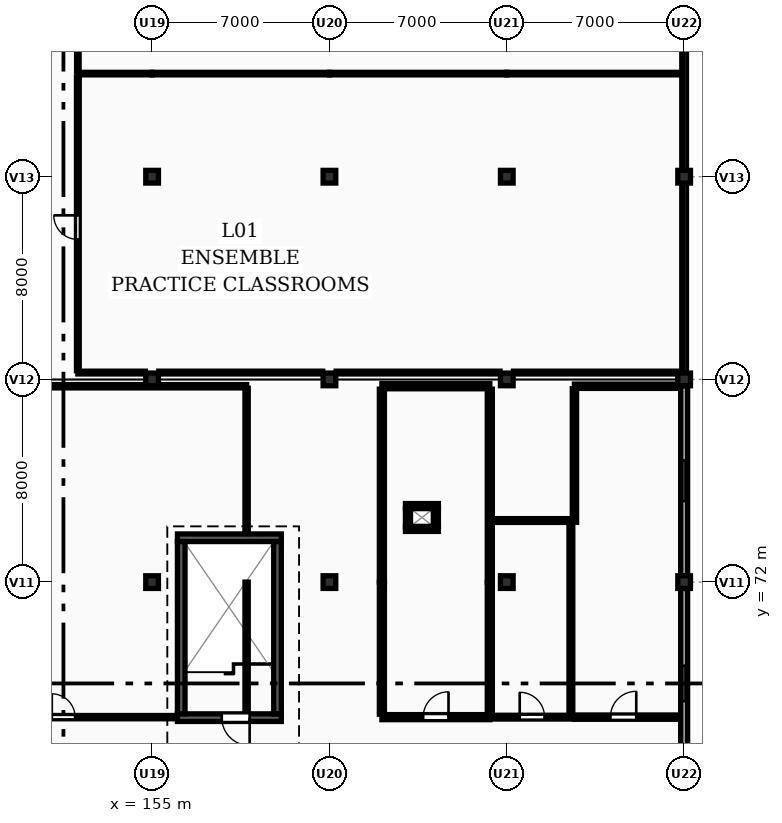
"""IFC4 building model, lengths in metres.
Left out: names, types, materials, properties, quantities, classifications, styles, units other than length and angle.
Written with IfcOpenShell. Run it as: python <this file> out.ifc"""

import sys

from ifc_helpers import new_model, si_unit, direction, frame, frame_2d, origin, origin_2d, place, context, subcontext, project, spatial, rectangle, extrude, element, fill, save


model = new_model("IFC4")
c1 = context("Model", 3, precision=1e-05, world=origin(), true_north=direction((0.0, 1.0)))
c2 = subcontext(c1, "Body", "Model", "MODEL_VIEW")
j1 = project(units=[si_unit("LENGTHUNIT", "METRE"), si_unit("PLANEANGLEUNIT", "RADIAN")], contexts=[c1])
p1 = place(None, origin())
s1 = spatial("IfcSite", under=j1, at=p1, CompositionType="ELEMENT")
p2 = place(p1, origin())
s2 = spatial("IfcBuilding", under=s1, at=p2, CompositionType="ELEMENT")
p3 = place(p2, frame((0.0, 0.0, 4.5)))
s3 = spatial("IfcBuildingStorey", under=s2, at=p3, CompositionType="ELEMENT", Elevation=4.5)
p4 = place(p3, frame((155.0, 72.0, 0.0), z_axis=(0.0, 0.0, 1.0), x_axis=(1.0, 0.0, 0.0)))
e1 = element("IfcColumn", 1, at=p4, inside=s3, PredefinedType="COLUMN", context=c2, shape_type="SweptSolid", body=[
    extrude(rectangle(XDim=0.5, YDim=0.5, at=origin_2d()), origin(), (0.0, 0.0, 1.0), 5.373),
])
p5 = place(p3, frame((155.0, 80.0, 0.0), z_axis=(0.0, 0.0, 1.0), x_axis=(1.0, 0.0, 0.0)))
e2 = element("IfcColumn", 2, at=p5, inside=s3, PredefinedType="COLUMN", context=c2, shape_type="SweptSolid", body=[
    extrude(rectangle(XDim=0.5, YDim=0.5, at=origin_2d()), origin(), (0.0, 0.0, 1.0), 5.958),
])
p6 = place(p3, frame((155.0, 88.0, 0.0), z_axis=(0.0, 0.0, 1.0), x_axis=(1.0, 0.0, 0.0)))
e3 = element("IfcColumn", 3, at=p6, inside=s3, PredefinedType="COLUMN", context=c2, shape_type="SweptSolid", body=[
    extrude(rectangle(XDim=0.5, YDim=0.5, at=origin_2d()), origin(), (0.0, 0.0, 1.0), 4.96),
])
p7 = place(p3, frame((162.0, 72.0, 0.0), z_axis=(0.0, 0.0, 1.0), x_axis=(1.0, 0.0, 0.0)))
e4 = element("IfcColumn", 4, at=p7, inside=s3, PredefinedType="COLUMN", context=c2, shape_type="SweptSolid", body=[
    extrude(rectangle(XDim=0.5, YDim=0.5, at=origin_2d()), origin(), (0.0, 0.0, 1.0), 5.307),
])
p8 = place(p3, frame((162.0, 80.0, 0.0), z_axis=(0.0, 0.0, 1.0), x_axis=(1.0, 0.0, 0.0)))
e5 = element("IfcColumn", 5, at=p8, inside=s3, PredefinedType="COLUMN", context=c2, shape_type="SweptSolid", body=[
    extrude(rectangle(XDim=0.5, YDim=0.5, at=origin_2d()), origin(), (0.0, 0.0, 1.0), 5.893),
])
p9 = place(p3, frame((162.0, 88.0, 0.0), z_axis=(0.0, 0.0, 1.0), x_axis=(1.0, 0.0, 0.0)))
e6 = element("IfcColumn", 6, at=p9, inside=s3, PredefinedType="COLUMN", context=c2, shape_type="SweptSolid", body=[
    extrude(rectangle(XDim=0.5, YDim=0.5, at=origin_2d()), origin(), (0.0, 0.0, 1.0), 5.365),
])
p10 = place(p3, frame((169.0, 72.0, 0.0), z_axis=(0.0, 0.0, 1.0), x_axis=(1.0, 0.0, 0.0)))
e7 = element("IfcColumn", 7, at=p10, inside=s3, PredefinedType="COLUMN", context=c2, shape_type="SweptSolid", body=[
    extrude(rectangle(XDim=0.5, YDim=0.5, at=origin_2d()), origin(), (0.0, 0.0, 1.0), 5.241),
])
p11 = place(p3, frame((169.0, 80.0, 0.0), z_axis=(0.0, 0.0, 1.0), x_axis=(1.0, 0.0, 0.0)))
e8 = element("IfcColumn", 8, at=p11, inside=s3, PredefinedType="COLUMN", context=c2, shape_type="SweptSolid", body=[
    extrude(rectangle(XDim=0.5, YDim=0.5, at=origin_2d()), origin(), (0.0, 0.0, 1.0), 5.827),
])
p12 = place(p3, frame((169.0, 88.0, 0.0), z_axis=(0.0, 0.0, 1.0), x_axis=(1.0, 0.0, 0.0)))
e9 = element("IfcColumn", 9, at=p12, inside=s3, PredefinedType="COLUMN", context=c2, shape_type="SweptSolid", body=[
    extrude(rectangle(XDim=0.5, YDim=0.5, at=origin_2d()), origin(), (0.0, 0.0, 1.0), 5.771),
])
p13 = place(p3, frame((176.0, 72.0, 0.0), z_axis=(0.0, 0.0, 1.0), x_axis=(1.0, 0.0, 0.0)))
e10 = element("IfcColumn", 10, at=p13, inside=s3, PredefinedType="COLUMN", context=c2, shape_type="SweptSolid", body=[
    extrude(rectangle(XDim=0.5, YDim=0.5, at=origin_2d()), origin(), (0.0, 0.0, 1.0), 5.175),
])
p14 = place(p3, frame((176.0, 80.0, 0.0), z_axis=(0.0, 0.0, 1.0), x_axis=(1.0, 0.0, 0.0)))
e11 = element("IfcColumn", 11, at=p14, inside=s3, PredefinedType="COLUMN", context=c2, shape_type="SweptSolid", body=[
    extrude(rectangle(XDim=0.5, YDim=0.5, at=origin_2d()), origin(), (0.0, 0.0, 1.0), 5.761),
])
p15 = place(p3, frame((176.0, 88.0, 0.0), z_axis=(0.0, 0.0, 1.0), x_axis=(1.0, 0.0, 0.0)))
e12 = element("IfcColumn", 12, at=p15, inside=s3, PredefinedType="COLUMN", context=c2, shape_type="SweptSolid", body=[
    extrude(rectangle(XDim=0.5, YDim=0.5, at=origin_2d()), origin(), (0.0, 0.0, 1.0), 6.176),
])
p16 = place(p3, frame((176.0, 71.75, 0.0), z_axis=(0.0, 0.0, 1.0), x_axis=(0.0, -1.0, 0.0)))
e13 = element("IfcWall", 13, at=p16, inside=s3, PredefinedType="SOLIDWALL", context=c2, shape_type="SweptSolid", body=[
    extrude(rectangle(XDim=7.5, YDim=0.275, at=frame_2d((3.75, 0.0))), origin(), (0.0, 0.0, 1.0), 3.878),
])
p17 = place(p16, frame((3.05, 0.0, 0.95)))
e14 = element("IfcOpeningElement", 14, at=p17, cuts=e13, PredefinedType="OPENING", context=c2, shape_type="SweptSolid", body=[
    extrude(rectangle(XDim=1.4, YDim=1.65, at=frame_2d((0.7, 0.825))), frame((0.0, 0.147, 0.0), z_axis=(0.0, -1.0, 0.0), x_axis=(1.0, 0.0, 0.0)), (0.0, 0.0, 1.0), 0.295),
])
p18 = place(p3, frame((176.0, 79.75, 0.0), z_axis=(0.0, 0.0, 1.0), x_axis=(0.0, -1.0, 0.0)))
e15 = element("IfcWall", 15, at=p18, inside=s3, PredefinedType="SOLIDWALL", context=c2, shape_type="SweptSolid", body=[
    extrude(rectangle(XDim=7.5, YDim=0.275, at=frame_2d((3.75, 0.0))), origin(), (0.0, 0.0, 1.0), 4.464),
])
p19 = place(p18, frame((2.95, 0.0, 0.95)))
e16 = element("IfcOpeningElement", 16, at=p19, cuts=e15, PredefinedType="OPENING", context=c2, shape_type="SweptSolid", body=[
    extrude(rectangle(XDim=1.6, YDim=1.65, at=frame_2d((0.8, 0.825))), frame((0.0, 0.147, 0.0), z_axis=(0.0, -1.0, 0.0), x_axis=(1.0, 0.0, 0.0)), (0.0, 0.0, 1.0), 0.295),
])
for number, where, z_axis, x_axis in (
    (17, (176.0, 95.75, 0.0), (0.0, 0.0, 1.0), (0.0, -1.0, 0.0)),
    (18, (176.0, 87.75, 0.0), (0.0, 0.0, 1.0), (0.0, -1.0, 0.0)),
):
    element("IfcWall", number, at=place(p3, frame(where, z_axis=z_axis, x_axis=x_axis)), inside=s3, PredefinedType="SOLIDWALL", context=c2, shape_type="SweptSolid", body=[
        extrude(rectangle(XDim=7.5, YDim=0.185, at=frame_2d((3.75, 0.0))), origin(), (0.0, 0.0, 1.0), 0.95),
    ])
p20 = place(p3, frame((160.1, 66.65, 0.0), z_axis=(0.0, 0.0, 1.0), x_axis=(-1.0, 0.0, 0.0)))
e19 = element("IfcWall", 19, at=p20, inside=s3, PredefinedType="SHEAR", context=c2, shape_type="SweptSolid", body=[
    extrude(rectangle(XDim=4.1, YDim=0.3, at=frame_2d((2.05, 0.0))), origin(), (0.0, 0.0, 1.0), 5.803),
])
p21 = place(p20, frame((1.25, 0.0, 0.0)))
e20 = element("IfcOpeningElement", 20, at=p21, cuts=e19, PredefinedType="OPENING", context=c2, shape_type="SweptSolid", body=[
    extrude(rectangle(XDim=1.1, YDim=2.15, at=frame_2d((0.55, 1.075))), frame((0.0, 0.16, 0.0), z_axis=(0.0, -1.0, 0.0), x_axis=(1.0, 0.0, 0.0)), (0.0, 0.0, 1.0), 0.32),
])
p22 = place(p3, frame((156.0, 73.75, 0.0), z_axis=(0.0, 0.0, 1.0), x_axis=(1.0, 0.0, 0.0)))
e21 = element("IfcWall", 21, at=p22, inside=s3, PredefinedType="SHEAR", context=c2, shape_type="SweptSolid", body=[
    extrude(rectangle(XDim=4.1, YDim=0.3, at=frame_2d((2.05, 0.0))), origin(), (0.0, 0.0, 1.0), 5.803),
])
for number, where, z_axis, x_axis in (
    (22, (159.95, 66.8, 0.0), (0.0, 0.0, 1.0), (0.0, 1.0, 0.0)),
    (23, (156.15, 73.6, 0.0), (0.0, 0.0, 1.0), (0.0, -1.0, 0.0)),
):
    element("IfcWall", number, at=place(p3, frame(where, z_axis=z_axis, x_axis=x_axis)), inside=s3, PredefinedType="SHEAR", context=c2, shape_type="SweptSolid", body=[
        extrude(rectangle(XDim=6.8, YDim=0.3, at=frame_2d((3.4, 0.0))), origin(), (0.0, 0.0, 1.0), 5.803),
    ])
for number, where, z_axis, x_axis in (
    (24, (166.3, 74.1, 0.0), (0.0, 0.0, 1.0), (-1.0, 0.0, 0.0)),
    (25, (165.0, 75.0, 0.0), (0.0, 0.0, 1.0), (1.0, 0.0, 0.0)),
):
    element("IfcWall", number, at=place(p3, frame(where, z_axis=z_axis, x_axis=x_axis)), inside=s3, PredefinedType="PARTITIONING", context=c2, shape_type="SweptSolid", body=[
        extrude(rectangle(XDim=1.3, YDim=0.2, at=frame_2d((0.65, 0.0))), origin(), (0.0, 0.0, 1.0), 3.65),
    ])
for number, where, z_axis, x_axis in (
    (26, (165.1, 74.2, 0.0), (0.0, 0.0, 1.0), (0.0, 1.0, 0.0)),
    (27, (166.2, 74.9, 0.0), (0.0, 0.0, 1.0), (0.0, -1.0, 0.0)),
):
    element("IfcWall", number, at=place(p3, frame(where, z_axis=z_axis, x_axis=x_axis)), inside=s3, PredefinedType="PARTITIONING", context=c2, shape_type="SweptSolid", body=[
        extrude(rectangle(XDim=0.7, YDim=0.2, at=frame_2d((0.35, 0.0))), origin(), (0.0, 0.0, 1.0), 3.65),
    ])
p23 = place(p3, frame((147.87, 66.67, 0.0), z_axis=(0.0, 0.0, 1.0), x_axis=(1.0, 0.0, 0.0)))
e28 = element("IfcWall", 28, at=p23, inside=s3, PredefinedType="PARTITIONING", context=c2, shape_type="SweptSolid", body=[
    extrude(rectangle(XDim=8.11, YDim=0.13, at=frame_2d((4.055, 0.0))), origin(), (0.0, 0.0, 1.0), 3.65),
])
p24 = place(p23, frame((3.17, 0.0, 0.0)))
e29 = element("IfcOpeningElement", 29, at=p24, cuts=e28, PredefinedType="OPENING", context=c2, shape_type="SweptSolid", body=[
    extrude(rectangle(XDim=0.92, YDim=2.1, at=frame_2d((0.46, 1.05))), frame((0.0, 0.075, 0.0), z_axis=(0.0, -1.0, 0.0), x_axis=(1.0, 0.0, 0.0)), (0.0, 0.0, 1.0), 0.15),
])
p25 = place(p3, frame((148.265, 79.73, 0.0), z_axis=(0.0, 0.0, 1.0), x_axis=(1.0, 0.0, 0.0)))
e30 = element("IfcWall", 30, at=p25, inside=s3, PredefinedType="PARTITIONING", context=c2, shape_type="SweptSolid", body=[
    extrude(rectangle(XDim=10.465, YDim=0.13, at=frame_2d((5.232, 0.0))), origin(), (0.0, 0.0, 1.0), 3.65),
])
p26 = place(p3, frame((158.73, 66.815, 0.0), z_axis=(0.0, 0.0, 1.0), x_axis=(0.0, 1.0, 0.0)))
e31 = element("IfcWall", 31, at=p26, inside=s3, PredefinedType="PARTITIONING", context=c2, shape_type="SweptSolid", body=[
    extrude(rectangle(XDim=5.185, YDim=0.13, at=frame_2d((2.593, 0.0))), origin(), (0.0, 0.0, 1.0), 3.65),
])
p27 = place(p3, frame((158.73, 73.915, 0.0), z_axis=(0.0, 0.0, 1.0), x_axis=(0.0, 1.0, 0.0)))
e32 = element("IfcWall", 32, at=p27, inside=s3, PredefinedType="PARTITIONING", context=c2, shape_type="SweptSolid", body=[
    extrude(rectangle(XDim=5.735, YDim=0.13, at=frame_2d((2.867, 0.0))), origin(), (0.0, 0.0, 1.0), 3.65),
])
p28 = place(p3, frame((164.07, 66.67, 0.0), z_axis=(0.0, 0.0, 1.0), x_axis=(1.0, 0.0, 0.0)))
e33 = element("IfcWall", 33, at=p28, inside=s3, PredefinedType="PARTITIONING", context=c2, shape_type="SweptSolid", body=[
    extrude(rectangle(XDim=4.26, YDim=0.2, at=frame_2d((2.13, 0.0))), origin(), (0.0, 0.0, 1.0), 3.65),
])
p29 = place(p28, frame((1.63, 0.0, 0.0)))
e34 = element("IfcOpeningElement", 34, at=p29, cuts=e33, PredefinedType="OPENING", context=c2, shape_type="SweptSolid", body=[
    extrude(rectangle(XDim=1.0, YDim=2.15, at=frame_2d((0.5, 1.075))), frame((0.0, 0.11, 0.0), z_axis=(0.0, -1.0, 0.0), x_axis=(1.0, 0.0, 0.0)), (0.0, 0.0, 1.0), 0.22),
])
p30 = place(p3, frame((164.07, 79.73, 0.0), z_axis=(0.0, 0.0, 1.0), x_axis=(1.0, 0.0, 0.0)))
e35 = element("IfcWall", 35, at=p30, inside=s3, PredefinedType="PARTITIONING", context=c2, shape_type="SweptSolid", body=[
    extrude(rectangle(XDim=4.26, YDim=0.2, at=frame_2d((2.13, 0.0))), origin(), (0.0, 0.0, 1.0), 3.65),
])
p31 = place(p3, frame((164.07, 66.785, 0.0), z_axis=(0.0, 0.0, 1.0), x_axis=(0.0, 1.0, 0.0)))
e36 = element("IfcWall", 36, at=p31, inside=s3, PredefinedType="PARTITIONING", context=c2, shape_type="SweptSolid", body=[
    extrude(rectangle(XDim=5.215, YDim=0.2, at=frame_2d((2.607, 0.0))), origin(), (0.0, 0.0, 1.0), 3.65),
])
p32 = place(p3, frame((164.07, 72.0, 0.0), z_axis=(0.0, 0.0, 1.0), x_axis=(0.0, 1.0, 0.0)))
e37 = element("IfcWall", 37, at=p32, inside=s3, PredefinedType="PARTITIONING", context=c2, shape_type="SweptSolid", body=[
    extrude(rectangle(XDim=7.615, YDim=0.2, at=frame_2d((3.808, 0.0))), origin(), (0.0, 0.0, 1.0), 3.65),
])
p33 = place(p3, frame((168.33, 66.785, 0.0), z_axis=(0.0, 0.0, 1.0), x_axis=(0.0, 1.0, 0.0)))
e38 = element("IfcWall", 38, at=p33, inside=s3, PredefinedType="PARTITIONING", context=c2, shape_type="SweptSolid", body=[
    extrude(rectangle(XDim=5.215, YDim=0.2, at=frame_2d((2.607, 0.0))), origin(), (0.0, 0.0, 1.0), 3.65),
])
p34 = place(p3, frame((168.33, 72.0, 0.0), z_axis=(0.0, 0.0, 1.0), x_axis=(0.0, 1.0, 0.0)))
e39 = element("IfcWall", 39, at=p34, inside=s3, PredefinedType="PARTITIONING", context=c2, shape_type="SweptSolid", body=[
    extrude(rectangle(XDim=7.615, YDim=0.2, at=frame_2d((3.808, 0.0))), origin(), (0.0, 0.0, 1.0), 3.65),
])
p35 = place(p3, frame((168.47, 66.67, 0.0), z_axis=(0.0, 0.0, 1.0), x_axis=(1.0, 0.0, 0.0)))
e40 = element("IfcWall", 40, at=p35, inside=s3, PredefinedType="PARTITIONING", context=c2, shape_type="SweptSolid", body=[
    extrude(rectangle(XDim=3.06, YDim=0.15, at=frame_2d((1.53, 0.0))), origin(), (0.0, 0.0, 1.0), 3.65),
])
p36 = place(p35, frame((1.04, 0.0, 0.0)))
e41 = element("IfcOpeningElement", 41, at=p36, cuts=e40, PredefinedType="OPENING", context=c2, shape_type="SweptSolid", body=[
    extrude(rectangle(XDim=0.98, YDim=2.1, at=frame_2d((0.49, 1.05))), frame((0.0, 0.085, 0.0), z_axis=(0.0, -1.0, 0.0), x_axis=(1.0, 0.0, 0.0)), (0.0, 0.0, 1.0), 0.17),
])
p37 = place(p3, frame((168.47, 74.43, 0.0), z_axis=(0.0, 0.0, 1.0), x_axis=(1.0, 0.0, 0.0)))
e42 = element("IfcWall", 42, at=p37, inside=s3, PredefinedType="PARTITIONING", context=c2, shape_type="SweptSolid", body=[
    extrude(rectangle(XDim=3.06, YDim=0.15, at=frame_2d((1.53, 0.0))), origin(), (0.0, 0.0, 1.0), 3.65),
])
p38 = place(p3, frame((171.53, 66.76, 0.0), z_axis=(0.0, 0.0, 1.0), x_axis=(0.0, 1.0, 0.0)))
e43 = element("IfcWall", 43, at=p38, inside=s3, PredefinedType="PARTITIONING", context=c2, shape_type="SweptSolid", body=[
    extrude(rectangle(XDim=7.58, YDim=0.15, at=frame_2d((3.79, 0.0))), origin(), (0.0, 0.0, 1.0), 3.65),
])
p39 = place(p3, frame((171.67, 66.67, 0.0), z_axis=(0.0, 0.0, 1.0), x_axis=(1.0, 0.0, 0.0)))
e44 = element("IfcWall", 44, at=p39, inside=s3, PredefinedType="PARTITIONING", context=c2, shape_type="SweptSolid", body=[
    extrude(rectangle(XDim=4.151, YDim=0.17, at=frame_2d((2.075, 0.0))), origin(), (0.0, 0.0, 1.0), 3.65),
])
p40 = place(p39, frame((1.42, 0.0, 0.0)))
e45 = element("IfcOpeningElement", 45, at=p40, cuts=e44, PredefinedType="OPENING", context=c2, shape_type="SweptSolid", body=[
    extrude(rectangle(XDim=1.02, YDim=2.1, at=frame_2d((0.51, 1.05))), frame((0.0, 0.095, 0.0), z_axis=(0.0, -1.0, 0.0), x_axis=(1.0, 0.0, 0.0)), (0.0, 0.0, 1.0), 0.19),
])
p41 = place(p3, frame((171.67, 79.73, 0.0), z_axis=(0.0, 0.0, 1.0), x_axis=(1.0, 0.0, 0.0)))
e46 = element("IfcWall", 46, at=p41, inside=s3, PredefinedType="PARTITIONING", context=c2, shape_type="SweptSolid", body=[
    extrude(rectangle(XDim=4.065, YDim=0.17, at=frame_2d((2.033, 0.0))), origin(), (0.0, 0.0, 1.0), 3.65),
])
p42 = place(p3, frame((171.67, 74.36, 0.0), z_axis=(0.0, 0.0, 1.0), x_axis=(0.0, 1.0, 0.0)))
e47 = element("IfcWall", 47, at=p42, inside=s3, PredefinedType="PARTITIONING", context=c2, shape_type="SweptSolid", body=[
    extrude(rectangle(XDim=5.27, YDim=0.17, at=frame_2d((2.635, 0.0))), origin(), (0.0, 0.0, 1.0), 3.65),
])
p43 = place(p3, frame((152.07, 92.07, 0.0), z_axis=(0.0, 0.0, 1.0), x_axis=(1.0, 0.0, 0.0)))
e48 = element("IfcWall", 48, at=p43, inside=s3, PredefinedType="PARTITIONING", context=c2, shape_type="SweptSolid", body=[
    extrude(rectangle(XDim=2.93, YDim=0.1, at=frame_2d((1.465, 0.0))), origin(), (0.0, 0.0, 1.0), 3.65),
])
for number, where, z_axis, x_axis in (
    (49, (155.0, 92.07, 0.0), (0.0, 0.0, 1.0), (1.0, 0.0, 0.0)),
    (50, (162.0, 92.07, 0.0), (0.0, 0.0, 1.0), (1.0, 0.0, 0.0)),
):
    element("IfcWall", number, at=place(p3, frame(where, z_axis=z_axis, x_axis=x_axis)), inside=s3, PredefinedType="PARTITIONING", context=c2, shape_type="SweptSolid", body=[
        extrude(rectangle(XDim=7.0, YDim=0.1, at=frame_2d((3.5, 0.0))), origin(), (0.0, 0.0, 1.0), 3.65),
    ])
p44 = place(p3, frame((169.0, 92.07, 0.0), z_axis=(0.0, 0.0, 1.0), x_axis=(1.0, 0.0, 0.0)))
e51 = element("IfcWall", 51, at=p44, inside=s3, PredefinedType="PARTITIONING", context=c2, shape_type="SweptSolid", body=[
    extrude(rectangle(XDim=6.865, YDim=0.1, at=frame_2d((3.433, 0.0))), origin(), (0.0, 0.0, 1.0), 3.65),
])
p45 = place(p3, frame((152.07, 92.135, 0.0), z_axis=(0.0, 0.0, 1.0), x_axis=(0.0, 1.0, 0.0)))
e52 = element("IfcWall", 52, at=p45, inside=s3, PredefinedType="PARTITIONING", context=c2, shape_type="SweptSolid", body=[
    extrude(rectangle(XDim=11.73, YDim=0.1, at=frame_2d((5.865, 0.0))), origin(), (0.0, 0.0, 1.0), 3.65),
])
p46 = place(p45, frame((5.405, 0.0, 0.0)))
e53 = element("IfcOpeningElement", 53, at=p46, cuts=e52, PredefinedType="OPENING", context=c2, shape_type="SweptSolid", body=[
    extrude(rectangle(XDim=0.92, YDim=2.1, at=frame_2d((0.46, 1.05))), frame((0.0, 0.06, 0.0), z_axis=(0.0, -1.0, 0.0), x_axis=(1.0, 0.0, 0.0)), (0.0, 0.0, 1.0), 0.12),
])
p47 = place(p3, frame((152.07, 80.27, 0.0), z_axis=(0.0, 0.0, 1.0), x_axis=(1.0, 0.0, 0.0)))
e54 = element("IfcWall", 54, at=p47, inside=s3, PredefinedType="PARTITIONING", context=c2, shape_type="SweptSolid", body=[
    extrude(rectangle(XDim=2.665, YDim=0.11, at=frame_2d((1.333, 0.0))), origin(), (0.0, 0.0, 1.0), 3.65),
])
for number, where, z_axis, x_axis in (
    (55, (155.265, 80.27, 0.0), (0.0, 0.0, 1.0), (1.0, 0.0, 0.0)),
    (56, (162.265, 80.27, 0.0), (0.0, 0.0, 1.0), (1.0, 0.0, 0.0)),
    (57, (169.265, 80.27, 0.0), (0.0, 0.0, 1.0), (1.0, 0.0, 0.0)),
):
    element("IfcWall", number, at=place(p3, frame(where, z_axis=z_axis, x_axis=x_axis)), inside=s3, PredefinedType="PARTITIONING", context=c2, shape_type="SweptSolid", body=[
        extrude(rectangle(XDim=6.47, YDim=0.11, at=frame_2d((3.235, 0.0))), origin(), (0.0, 0.0, 1.0), 3.65),
    ])
p48 = place(p3, frame((152.07, 80.34, 0.0), z_axis=(0.0, 0.0, 1.0), x_axis=(0.0, 1.0, 0.0)))
e58 = element("IfcWall", 58, at=p48, inside=s3, PredefinedType="PARTITIONING", context=c2, shape_type="SweptSolid", body=[
    extrude(rectangle(XDim=11.59, YDim=0.11, at=frame_2d((5.795, 0.0))), origin(), (0.0, 0.0, 1.0), 3.65),
])
p49 = place(p48, frame((5.185, 0.0, 0.0)))
e59 = element("IfcOpeningElement", 59, at=p49, cuts=e58, PredefinedType="OPENING", context=c2, shape_type="SweptSolid", body=[
    extrude(rectangle(XDim=0.95, YDim=2.1, at=frame_2d((0.475, 1.05))), frame((0.0, 0.065, 0.0), z_axis=(0.0, -1.0, 0.0), x_axis=(1.0, 0.0, 0.0)), (0.0, 0.0, 1.0), 0.13),
])
p50 = place(p17, origin())
e60 = element("IfcWindow", 60, at=p50, inside=s3, PartitioningType="SINGLE_PANEL", PredefinedType="WINDOW", context=c2, shape_type="SweptSolid", body=[
    extrude(rectangle(XDim=1.4, YDim=1.65, at=frame_2d((0.7, 0.825))), frame((0.0, 0.03, 0.0), z_axis=(0.0, -1.0, 0.0), x_axis=(1.0, 0.0, 0.0)), (0.0, 0.0, 1.0), 0.06),
])
fill(e14, e60)
p51 = place(p19, origin())
e61 = element("IfcWindow", 61, at=p51, inside=s3, PartitioningType="DOUBLE_PANEL_VERTICAL", PredefinedType="WINDOW", context=c2, shape_type="SweptSolid", body=[
    extrude(rectangle(XDim=1.6, YDim=1.65, at=frame_2d((0.8, 0.825))), frame((0.0, 0.03, 0.0), z_axis=(0.0, -1.0, 0.0), x_axis=(1.0, 0.0, 0.0)), (0.0, 0.0, 1.0), 0.06),
])
fill(e16, e61)
p52 = place(p21, origin())
e62 = element("IfcDoor", 62, at=p52, inside=s3, OperationType="SINGLE_SWING_LEFT", PredefinedType="DOOR", context=c2, shape_type="SweptSolid", body=[
    extrude(rectangle(XDim=1.1, YDim=2.15, at=frame_2d((0.55, 1.075))), frame((0.0, 0.025, 0.0), z_axis=(0.0, -1.0, 0.0), x_axis=(1.0, 0.0, 0.0)), (0.0, 0.0, 1.0), 0.05),
])
fill(e20, e62)
p53 = place(p24, origin())
e63 = element("IfcDoor", 63, at=p53, inside=s3, OperationType="SINGLE_SWING_LEFT", PredefinedType="DOOR", context=c2, shape_type="SweptSolid", body=[
    extrude(rectangle(XDim=0.92, YDim=2.1, at=frame_2d((0.46, 1.05))), frame((0.0, 0.025, 0.0), z_axis=(0.0, -1.0, 0.0), x_axis=(1.0, 0.0, 0.0)), (0.0, 0.0, 1.0), 0.05),
])
fill(e29, e63)
p54 = place(p29, origin())
e64 = element("IfcDoor", 64, at=p54, inside=s3, OperationType="SINGLE_SWING_RIGHT", PredefinedType="DOOR", context=c2, shape_type="SweptSolid", body=[
    extrude(rectangle(XDim=1.0, YDim=2.15, at=frame_2d((0.5, 1.075))), frame((0.0, 0.025, 0.0), z_axis=(0.0, -1.0, 0.0), x_axis=(1.0, 0.0, 0.0)), (0.0, 0.0, 1.0), 0.05),
])
fill(e34, e64)
p55 = place(p36, origin())
e65 = element("IfcDoor", 65, at=p55, inside=s3, OperationType="SINGLE_SWING_LEFT", PredefinedType="DOOR", context=c2, shape_type="SweptSolid", body=[
    extrude(rectangle(XDim=0.98, YDim=2.1, at=frame_2d((0.49, 1.05))), frame((0.0, 0.025, 0.0), z_axis=(0.0, -1.0, 0.0), x_axis=(1.0, 0.0, 0.0)), (0.0, 0.0, 1.0), 0.05),
])
fill(e41, e65)
p56 = place(p40, origin())
e66 = element("IfcDoor", 66, at=p56, inside=s3, OperationType="SINGLE_SWING_RIGHT", PredefinedType="DOOR", context=c2, shape_type="SweptSolid", body=[
    extrude(rectangle(XDim=1.02, YDim=2.1, at=frame_2d((0.51, 1.05))), frame((0.0, 0.025, 0.0), z_axis=(0.0, -1.0, 0.0), x_axis=(1.0, 0.0, 0.0)), (0.0, 0.0, 1.0), 0.05),
])
fill(e45, e66)
p57 = place(p49, origin())
e67 = element("IfcDoor", 67, at=p57, inside=s3, OperationType="SINGLE_SWING_RIGHT", PredefinedType="DOOR", context=c2, shape_type="SweptSolid", body=[
    extrude(rectangle(XDim=0.95, YDim=2.1, at=frame_2d((0.475, 1.05))), frame((0.0, 0.025, 0.0), z_axis=(0.0, -1.0, 0.0), x_axis=(1.0, 0.0, 0.0)), (0.0, 0.0, 1.0), 0.05),
])
fill(e59, e67)
save(model, sys.argv[1])
